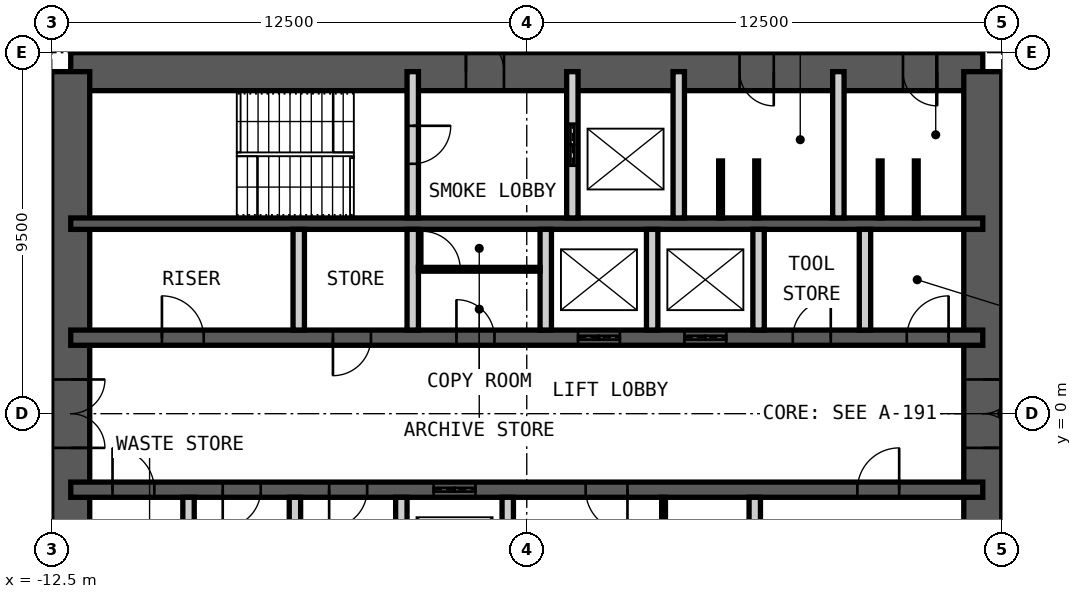
"""IFC4 building model, lengths in metres.
Left out: names, types, materials, properties, quantities, classifications, styles, units other than length and angle.
Written with IfcOpenShell. Run it as: python <this file> out.ifc"""

import sys

from ifc_helpers import new_model, si_unit, direction, frame, frame_2d, origin, place, context, subcontext, project, spatial, rectangle, extrude, element, fill, save


model = new_model("IFC4")
c1 = context("Model", 3, precision=1e-05, world=origin(), true_north=direction((0.0, 1.0)))
c2 = subcontext(c1, "Body", "Model", "MODEL_VIEW")
j1 = project(units=[si_unit("LENGTHUNIT", "METRE"), si_unit("PLANEANGLEUNIT", "RADIAN")], contexts=[c1])
p1 = place(None, origin())
s1 = spatial("IfcSite", under=j1, at=p1, CompositionType="ELEMENT")
p2 = place(p1, origin())
s2 = spatial("IfcBuilding", under=s1, at=p2, CompositionType="ELEMENT")
p3 = place(p2, frame((0.0, 0.0, 262.0)))
s3 = spatial("IfcBuildingStorey", under=s2, at=p3, CompositionType="ELEMENT", Elevation=262.0)
p4 = place(p3, frame((-12.0, 9.0, 0.0), z_axis=(0.0, 0.0, 1.0), x_axis=(1.0, 0.0, 0.0)))
e1 = element("IfcWall", 1, at=p4, inside=s3, PredefinedType="SHEAR", context=c2, shape_type="SweptSolid", body=[
    extrude(rectangle(XDim=24.0, YDim=1.0, at=frame_2d((12.0, 0.0))), origin(), (0.0, 0.0, 1.0), 4.2),
])
p5 = place(p4, frame((10.4, 0.0, 0.0)))
e2 = element("IfcOpeningElement", 2, at=p5, cuts=e1, PredefinedType="OPENING", context=c2, shape_type="SweptSolid", body=[
    extrude(rectangle(XDim=1.0, YDim=2.1, at=frame_2d((0.5, 1.05))), frame((0.0, 0.51, 0.0), z_axis=(0.0, -1.0, 0.0), x_axis=(1.0, 0.0, 0.0)), (0.0, 0.0, 1.0), 1.02),
])
p6 = place(p4, frame((17.6, 0.0, 0.0)))
e3 = element("IfcOpeningElement", 3, at=p6, cuts=e1, PredefinedType="OPENING", context=c2, shape_type="SweptSolid", body=[
    extrude(rectangle(XDim=0.9, YDim=2.1, at=frame_2d((0.45, 1.05))), frame((0.0, 0.51, 0.0), z_axis=(0.0, -1.0, 0.0), x_axis=(1.0, 0.0, 0.0)), (0.0, 0.0, 1.0), 1.02),
])
p7 = place(p4, frame((21.9, 0.0, 0.0)))
e4 = element("IfcOpeningElement", 4, at=p7, cuts=e1, PredefinedType="OPENING", context=c2, shape_type="SweptSolid", body=[
    extrude(rectangle(XDim=0.9, YDim=2.1, at=frame_2d((0.45, 1.05))), frame((0.0, 0.51, 0.0), z_axis=(0.0, -1.0, 0.0), x_axis=(1.0, 0.0, 0.0)), (0.0, 0.0, 1.0), 1.02),
])
p8 = place(p3, frame((12.0, -9.0, 0.0), z_axis=(0.0, 0.0, 1.0), x_axis=(0.0, 1.0, 0.0)))
e5 = element("IfcWall", 5, at=p8, inside=s3, PredefinedType="SHEAR", context=c2, shape_type="SweptSolid", body=[
    extrude(rectangle(XDim=18.0, YDim=1.0, at=frame_2d((9.0, 0.0))), origin(), (0.0, 0.0, 1.0), 4.2),
])
p9 = place(p8, frame((8.1, 0.0, 0.0)))
e6 = element("IfcOpeningElement", 6, at=p9, cuts=e5, PredefinedType="OPENING", context=c2, shape_type="SweptSolid", body=[
    extrude(rectangle(XDim=1.8, YDim=2.1, at=frame_2d((0.9, 1.05))), frame((0.0, 0.51, 0.0), z_axis=(0.0, -1.0, 0.0), x_axis=(1.0, 0.0, 0.0)), (0.0, 0.0, 1.0), 1.02),
])
p10 = place(p3, frame((-12.0, -9.0, 0.0), z_axis=(0.0, 0.0, 1.0), x_axis=(0.0, 1.0, 0.0)))
e7 = element("IfcWall", 7, at=p10, inside=s3, PredefinedType="SHEAR", context=c2, shape_type="SweptSolid", body=[
    extrude(rectangle(XDim=18.0, YDim=1.0, at=frame_2d((9.0, 0.0))), origin(), (0.0, 0.0, 1.0), 4.2),
])
p11 = place(p10, frame((8.1, 0.0, 0.0)))
e8 = element("IfcOpeningElement", 8, at=p11, cuts=e7, PredefinedType="OPENING", context=c2, shape_type="SweptSolid", body=[
    extrude(rectangle(XDim=1.8, YDim=2.1, at=frame_2d((0.9, 1.05))), frame((0.0, 0.51, 0.0), z_axis=(0.0, -1.0, 0.0), x_axis=(1.0, 0.0, 0.0)), (0.0, 0.0, 1.0), 1.02),
])
p12 = place(p3, frame((-12.0, 5.0, 0.0), z_axis=(0.0, 0.0, 1.0), x_axis=(1.0, 0.0, 0.0)))
e9 = element("IfcWall", 9, at=p12, inside=s3, PredefinedType="SHEAR", context=c2, shape_type="SweptSolid", body=[
    extrude(rectangle(XDim=24.0, YDim=0.3, at=frame_2d((12.0, 0.0))), origin(), (0.0, 0.0, 1.0), 4.2),
])
p13 = place(p3, frame((-12.0, 2.0, 0.0), z_axis=(0.0, 0.0, 1.0), x_axis=(1.0, 0.0, 0.0)))
e10 = element("IfcWall", 10, at=p13, inside=s3, PredefinedType="SHEAR", context=c2, shape_type="SweptSolid", body=[
    extrude(rectangle(XDim=24.0, YDim=0.4, at=frame_2d((12.0, 0.0))), origin(), (0.0, 0.0, 1.0), 4.2),
])
p14 = place(p13, frame((2.4, 0.0, 0.0)))
e11 = element("IfcOpeningElement", 11, at=p14, cuts=e10, PredefinedType="OPENING", context=c2, shape_type="SweptSolid", body=[
    extrude(rectangle(XDim=1.1, YDim=2.1, at=frame_2d((0.55, 1.05))), frame((0.0, 0.21, 0.0), z_axis=(0.0, -1.0, 0.0), x_axis=(1.0, 0.0, 0.0)), (0.0, 0.0, 1.0), 0.42),
])
p15 = place(p13, frame((22.0, 0.0, 0.0)))
e12 = element("IfcOpeningElement", 12, at=p15, cuts=e10, PredefinedType="OPENING", context=c2, shape_type="SweptSolid", body=[
    extrude(rectangle(XDim=1.1, YDim=2.1, at=frame_2d((0.55, 1.05))), frame((0.0, 0.21, 0.0), z_axis=(0.0, -1.0, 0.0), x_axis=(1.0, 0.0, 0.0)), (0.0, 0.0, 1.0), 0.42),
])
p16 = place(p13, frame((10.15, 0.0, 0.0)))
e13 = element("IfcOpeningElement", 13, at=p16, cuts=e10, PredefinedType="OPENING", context=c2, shape_type="SweptSolid", body=[
    extrude(rectangle(XDim=1.0, YDim=2.1, at=frame_2d((0.5, 1.05))), frame((0.0, 0.21, 0.0), z_axis=(0.0, -1.0, 0.0), x_axis=(1.0, 0.0, 0.0)), (0.0, 0.0, 1.0), 0.42),
])
p17 = place(p13, frame((6.9, 0.0, 0.0)))
e14 = element("IfcOpeningElement", 14, at=p17, cuts=e10, PredefinedType="OPENING", context=c2, shape_type="SweptSolid", body=[
    extrude(rectangle(XDim=1.0, YDim=2.1, at=frame_2d((0.5, 1.05))), frame((0.0, 0.21, 0.0), z_axis=(0.0, -1.0, 0.0), x_axis=(1.0, 0.0, 0.0)), (0.0, 0.0, 1.0), 0.42),
])
p18 = place(p13, frame((13.35, 0.0, 0.0)))
e15 = element("IfcOpeningElement", 15, at=p18, cuts=e10, PredefinedType="OPENING", context=c2, shape_type="SweptSolid", body=[
    extrude(rectangle(XDim=1.1, YDim=2.4, at=frame_2d((0.55, 1.2))), frame((0.0, 0.21, 0.0), z_axis=(0.0, -1.0, 0.0), x_axis=(1.0, 0.0, 0.0)), (0.0, 0.0, 1.0), 0.42),
])
p19 = place(p13, frame((16.15, 0.0, 0.0)))
e16 = element("IfcOpeningElement", 16, at=p19, cuts=e10, PredefinedType="OPENING", context=c2, shape_type="SweptSolid", body=[
    extrude(rectangle(XDim=1.1, YDim=2.4, at=frame_2d((0.55, 1.2))), frame((0.0, 0.21, 0.0), z_axis=(0.0, -1.0, 0.0), x_axis=(1.0, 0.0, 0.0)), (0.0, 0.0, 1.0), 0.42),
])
p20 = place(p13, frame((19.0, 0.0, 0.0)))
e17 = element("IfcOpeningElement", 17, at=p20, cuts=e10, PredefinedType="OPENING", context=c2, shape_type="SweptSolid", body=[
    extrude(rectangle(XDim=1.0, YDim=2.1, at=frame_2d((0.5, 1.05))), frame((0.0, 0.21, 0.0), z_axis=(0.0, -1.0, 0.0), x_axis=(1.0, 0.0, 0.0)), (0.0, 0.0, 1.0), 0.42),
])
p21 = place(p3, frame((-12.0, -2.0, 0.0), z_axis=(0.0, 0.0, 1.0), x_axis=(1.0, 0.0, 0.0)))
e18 = element("IfcWall", 18, at=p21, inside=s3, PredefinedType="SHEAR", context=c2, shape_type="SweptSolid", body=[
    extrude(rectangle(XDim=24.0, YDim=0.4, at=frame_2d((12.0, 0.0))), origin(), (0.0, 0.0, 1.0), 4.2),
])
p22 = place(p21, frame((1.1, 0.0, 0.0)))
e19 = element("IfcOpeningElement", 19, at=p22, cuts=e18, PredefinedType="OPENING", context=c2, shape_type="SweptSolid", body=[
    extrude(rectangle(XDim=1.1, YDim=2.1, at=frame_2d((0.55, 1.05))), frame((0.0, 0.21, 0.0), z_axis=(0.0, -1.0, 0.0), x_axis=(1.0, 0.0, 0.0)), (0.0, 0.0, 1.0), 0.42),
])
p23 = place(p21, frame((13.55, 0.0, 0.0)))
e20 = element("IfcOpeningElement", 20, at=p23, cuts=e18, PredefinedType="OPENING", context=c2, shape_type="SweptSolid", body=[
    extrude(rectangle(XDim=1.1, YDim=2.1, at=frame_2d((0.55, 1.05))), frame((0.0, 0.21, 0.0), z_axis=(0.0, -1.0, 0.0), x_axis=(1.0, 0.0, 0.0)), (0.0, 0.0, 1.0), 0.42),
])
p24 = place(p21, frame((20.7, 0.0, 0.0)))
e21 = element("IfcOpeningElement", 21, at=p24, cuts=e18, PredefinedType="OPENING", context=c2, shape_type="SweptSolid", body=[
    extrude(rectangle(XDim=1.1, YDim=2.1, at=frame_2d((0.55, 1.05))), frame((0.0, 0.21, 0.0), z_axis=(0.0, -1.0, 0.0), x_axis=(1.0, 0.0, 0.0)), (0.0, 0.0, 1.0), 0.42),
])
p25 = place(p21, frame((4.0, 0.0, 0.0)))
e22 = element("IfcOpeningElement", 22, at=p25, cuts=e18, PredefinedType="OPENING", context=c2, shape_type="SweptSolid", body=[
    extrude(rectangle(XDim=1.0, YDim=2.1, at=frame_2d((0.5, 1.05))), frame((0.0, 0.21, 0.0), z_axis=(0.0, -1.0, 0.0), x_axis=(1.0, 0.0, 0.0)), (0.0, 0.0, 1.0), 0.42),
])
p26 = place(p21, frame((6.8, 0.0, 0.0)))
e23 = element("IfcOpeningElement", 23, at=p26, cuts=e18, PredefinedType="OPENING", context=c2, shape_type="SweptSolid", body=[
    extrude(rectangle(XDim=1.0, YDim=2.1, at=frame_2d((0.5, 1.05))), frame((0.0, 0.21, 0.0), z_axis=(0.0, -1.0, 0.0), x_axis=(1.0, 0.0, 0.0)), (0.0, 0.0, 1.0), 0.42),
])
p27 = place(p21, frame((9.55, 0.0, 0.0)))
e24 = element("IfcOpeningElement", 24, at=p27, cuts=e18, PredefinedType="OPENING", context=c2, shape_type="SweptSolid", body=[
    extrude(rectangle(XDim=1.1, YDim=2.4, at=frame_2d((0.55, 1.2))), frame((0.0, 0.21, 0.0), z_axis=(0.0, -1.0, 0.0), x_axis=(1.0, 0.0, 0.0)), (0.0, 0.0, 1.0), 0.42),
])
p28 = place(p3, frame((-3.0, 5.15, 0.0), z_axis=(0.0, 0.0, 1.0), x_axis=(0.0, 1.0, 0.0)))
e25 = element("IfcWall", 25, at=p28, inside=s3, PredefinedType="PARTITIONING", context=c2, shape_type="SweptSolid", body=[
    extrude(rectangle(XDim=3.85, YDim=0.3, at=frame_2d((1.925, 0.0))), origin(), (0.0, 0.0, 1.0), 3.98),
])
p29 = place(p28, frame((1.425, 0.0, 0.0)))
e26 = element("IfcOpeningElement", 26, at=p29, cuts=e25, PredefinedType="OPENING", context=c2, shape_type="SweptSolid", body=[
    extrude(rectangle(XDim=1.0, YDim=2.1, at=frame_2d((0.5, 1.05))), frame((0.0, 0.16, 0.0), z_axis=(0.0, -1.0, 0.0), x_axis=(1.0, 0.0, 0.0)), (0.0, 0.0, 1.0), 0.32),
])
p30 = place(p3, frame((1.2, 5.15, 0.0), z_axis=(0.0, 0.0, 1.0), x_axis=(0.0, 1.0, 0.0)))
e27 = element("IfcWall", 27, at=p30, inside=s3, PredefinedType="PARTITIONING", context=c2, shape_type="SweptSolid", body=[
    extrude(rectangle(XDim=3.85, YDim=0.3, at=frame_2d((1.925, 0.0))), origin(), (0.0, 0.0, 1.0), 3.98),
])
p31 = place(p30, frame((1.375, 0.0, 0.0)))
e28 = element("IfcOpeningElement", 28, at=p31, cuts=e27, PredefinedType="OPENING", context=c2, shape_type="SweptSolid", body=[
    extrude(rectangle(XDim=1.1, YDim=2.4, at=frame_2d((0.55, 1.2))), frame((0.0, 0.16, 0.0), z_axis=(0.0, -1.0, 0.0), x_axis=(1.0, 0.0, 0.0)), (0.0, 0.0, 1.0), 0.32),
])
for number, where, z_axis, x_axis in (
    (29, (4.0, 5.15, 0.0), (0.0, 0.0, 1.0), (0.0, 1.0, 0.0)),
    (30, (8.2, 5.15, 0.0), (0.0, 0.0, 1.0), (0.0, 1.0, 0.0)),
):
    element("IfcWall", number, at=place(p3, frame(where, z_axis=z_axis, x_axis=x_axis)), inside=s3, PredefinedType="PARTITIONING", context=c2, shape_type="SweptSolid", body=[
        extrude(rectangle(XDim=3.85, YDim=0.3, at=frame_2d((1.925, 0.0))), origin(), (0.0, 0.0, 1.0), 3.98),
    ])
for number, where, z_axis, x_axis in (
    (31, (-6.0, 2.2, 0.0), (0.0, 0.0, 1.0), (0.0, 1.0, 0.0)),
    (32, (-3.0, 2.2, 0.0), (0.0, 0.0, 1.0), (0.0, 1.0, 0.0)),
    (33, (0.5, 2.2, 0.0), (0.0, 0.0, 1.0), (0.0, 1.0, 0.0)),
    (34, (3.3, 2.2, 0.0), (0.0, 0.0, 1.0), (0.0, 1.0, 0.0)),
    (35, (6.1, 2.2, 0.0), (0.0, 0.0, 1.0), (0.0, 1.0, 0.0)),
    (36, (8.9, 2.2, 0.0), (0.0, 0.0, 1.0), (0.0, 1.0, 0.0)),
    (37, (-8.9, -4.85, 0.0), (0.0, 0.0, 1.0), (0.0, 1.0, 0.0)),
    (38, (-6.1, -4.85, 0.0), (0.0, 0.0, 1.0), (0.0, 1.0, 0.0)),
    (39, (-3.3, -4.85, 0.0), (0.0, 0.0, 1.0), (0.0, 1.0, 0.0)),
    (40, (-0.5, -4.85, 0.0), (0.0, 0.0, 1.0), (0.0, 1.0, 0.0)),
    (41, (6.0, -4.85, 0.0), (0.0, 0.0, 1.0), (0.0, 1.0, 0.0)),
):
    element("IfcWall", number, at=place(p3, frame(where, z_axis=z_axis, x_axis=x_axis)), inside=s3, PredefinedType="PARTITIONING", context=c2, shape_type="SweptSolid", body=[
        extrude(rectangle(XDim=2.65, YDim=0.3, at=frame_2d((1.325, 0.0))), origin(), (0.0, 0.0, 1.0), 3.98),
    ])
p32 = place(p3, frame((-2.85, 3.8, 0.0), z_axis=(0.0, 0.0, 1.0), x_axis=(1.0, 0.0, 0.0)))
e42 = element("IfcWall", 42, at=p32, inside=s3, PredefinedType="PARTITIONING", context=c2, shape_type="SweptSolid", body=[
    extrude(rectangle(XDim=3.2, YDim=0.1, at=frame_2d((1.6, 0.0))), origin(), (0.0, 0.0, 1.0), 3.98),
])
p33 = place(p32, frame((0.1, 0.0, 0.0)))
e43 = element("IfcOpeningElement", 43, at=p33, cuts=e42, PredefinedType="OPENING", context=c2, shape_type="SweptSolid", body=[
    extrude(rectangle(XDim=1.0, YDim=2.4, at=frame_2d((0.5, 1.2))), frame((0.0, 0.06, 0.0), z_axis=(0.0, -1.0, 0.0), x_axis=(1.0, 0.0, 0.0)), (0.0, 0.0, 1.0), 0.12),
])
p34 = place(p3, frame((3.6, -4.85, 0.0), z_axis=(0.0, 0.0, 1.0), x_axis=(0.0, 1.0, 0.0)))
e44 = element("IfcWall", 44, at=p34, inside=s3, PredefinedType="PARTITIONING", context=c2, shape_type="SweptSolid", body=[
    extrude(rectangle(XDim=2.65, YDim=0.1, at=frame_2d((1.325, 0.0))), origin(), (0.0, 0.0, 1.0), 3.98),
])
p35 = place(p34, frame((0.1, 0.0, 0.0)))
e45 = element("IfcOpeningElement", 45, at=p35, cuts=e44, PredefinedType="OPENING", context=c2, shape_type="SweptSolid", body=[
    extrude(rectangle(XDim=1.0, YDim=2.4, at=frame_2d((0.5, 1.2))), frame((0.0, 0.06, 0.0), z_axis=(0.0, -1.0, 0.0), x_axis=(1.0, 0.0, 0.0)), (0.0, 0.0, 1.0), 0.12),
])
for number, where, z_axis, x_axis in (
    (46, (5.1, 5.15, 0.0), (0.0, 0.0, 1.0), (0.0, 1.0, 0.0)),
    (47, (6.05, 5.15, 0.0), (0.0, 0.0, 1.0), (0.0, 1.0, 0.0)),
    (48, (9.3, 5.15, 0.0), (0.0, 0.0, 1.0), (0.0, 1.0, 0.0)),
    (49, (10.25, 5.15, 0.0), (0.0, 0.0, 1.0), (0.0, 1.0, 0.0)),
):
    element("IfcWall", number, at=place(p3, frame(where, z_axis=z_axis, x_axis=x_axis)), inside=s3, PredefinedType="PARTITIONING", context=c2, shape_type="SweptSolid", body=[
        extrude(rectangle(XDim=1.5, YDim=0.1, at=frame_2d((0.75, 0.0))), origin(), (0.0, 0.0, 1.0), 2.1),
    ])
p36 = place(p5, origin())
e50 = element("IfcDoor", 50, at=p36, inside=s3, OperationType="SINGLE_SWING_RIGHT", PredefinedType="DOOR", context=c2, shape_type="SweptSolid", body=[
    extrude(rectangle(XDim=1.0, YDim=2.1, at=frame_2d((0.5, 1.05))), frame((0.0, 0.025, 0.0), z_axis=(0.0, -1.0, 0.0), x_axis=(1.0, 0.0, 0.0)), (0.0, 0.0, 1.0), 0.05),
])
fill(e2, e50)
p37 = place(p6, origin())
e51 = element("IfcDoor", 51, at=p37, inside=s3, OperationType="SINGLE_SWING_RIGHT", PredefinedType="DOOR", context=c2, shape_type="SweptSolid", body=[
    extrude(rectangle(XDim=0.9, YDim=2.1, at=frame_2d((0.45, 1.05))), frame((0.0, 0.025, 0.0), z_axis=(0.0, -1.0, 0.0), x_axis=(1.0, 0.0, 0.0)), (0.0, 0.0, 1.0), 0.05),
])
fill(e3, e51)
p38 = place(p7, origin())
e52 = element("IfcDoor", 52, at=p38, inside=s3, OperationType="SINGLE_SWING_RIGHT", PredefinedType="DOOR", context=c2, shape_type="SweptSolid", body=[
    extrude(rectangle(XDim=0.9, YDim=2.1, at=frame_2d((0.45, 1.05))), frame((0.0, 0.025, 0.0), z_axis=(0.0, -1.0, 0.0), x_axis=(1.0, 0.0, 0.0)), (0.0, 0.0, 1.0), 0.05),
])
fill(e4, e52)
p39 = place(p29, origin())
e53 = element("IfcDoor", 53, at=p39, inside=s3, OperationType="SINGLE_SWING_RIGHT", PredefinedType="DOOR", context=c2, shape_type="SweptSolid", body=[
    extrude(rectangle(XDim=1.0, YDim=2.1, at=frame_2d((0.5, 1.05))), frame((0.0, 0.025, 0.0), z_axis=(0.0, -1.0, 0.0), x_axis=(1.0, 0.0, 0.0)), (0.0, 0.0, 1.0), 0.05),
])
fill(e26, e53)
p40 = place(p14, origin())
e54 = element("IfcDoor", 54, at=p40, inside=s3, OperationType="SINGLE_SWING_RIGHT", PredefinedType="DOOR", context=c2, shape_type="SweptSolid", body=[
    extrude(rectangle(XDim=1.1, YDim=2.1, at=frame_2d((0.55, 1.05))), frame((0.0, 0.025, 0.0), z_axis=(0.0, -1.0, 0.0), x_axis=(1.0, 0.0, 0.0)), (0.0, 0.0, 1.0), 0.05),
])
fill(e11, e54)
p41 = place(p22, origin())
e55 = element("IfcDoor", 55, at=p41, inside=s3, OperationType="SINGLE_SWING_RIGHT", PredefinedType="DOOR", context=c2, shape_type="SweptSolid", body=[
    extrude(rectangle(XDim=1.1, YDim=2.1, at=frame_2d((0.55, 1.05))), frame((0.0, 0.025, 0.0), z_axis=(0.0, -1.0, 0.0), x_axis=(1.0, 0.0, 0.0)), (0.0, 0.0, 1.0), 0.05),
])
fill(e19, e55)
p42 = place(p15, origin())
e56 = element("IfcDoor", 56, at=p42, inside=s3, OperationType="SINGLE_SWING_LEFT", PredefinedType="DOOR", context=c2, shape_type="SweptSolid", body=[
    extrude(rectangle(XDim=1.1, YDim=2.1, at=frame_2d((0.55, 1.05))), frame((0.0, 0.025, 0.0), z_axis=(0.0, -1.0, 0.0), x_axis=(1.0, 0.0, 0.0)), (0.0, 0.0, 1.0), 0.05),
])
fill(e12, e56)
p43 = place(p16, origin())
e57 = element("IfcDoor", 57, at=p43, inside=s3, OperationType="SINGLE_SWING_RIGHT", PredefinedType="DOOR", context=c2, shape_type="SweptSolid", body=[
    extrude(rectangle(XDim=1.0, YDim=2.1, at=frame_2d((0.5, 1.05))), frame((0.0, 0.025, 0.0), z_axis=(0.0, -1.0, 0.0), x_axis=(1.0, 0.0, 0.0)), (0.0, 0.0, 1.0), 0.05),
])
fill(e13, e57)
p44 = place(p23, origin())
e58 = element("IfcDoor", 58, at=p44, inside=s3, OperationType="SINGLE_SWING_RIGHT", PredefinedType="DOOR", context=c2, shape_type="SweptSolid", body=[
    extrude(rectangle(XDim=1.1, YDim=2.1, at=frame_2d((0.55, 1.05))), frame((0.0, 0.025, 0.0), z_axis=(0.0, -1.0, 0.0), x_axis=(1.0, 0.0, 0.0)), (0.0, 0.0, 1.0), 0.05),
])
fill(e20, e58)
p45 = place(p24, origin())
e59 = element("IfcDoor", 59, at=p45, inside=s3, OperationType="SINGLE_SWING_LEFT", PredefinedType="DOOR", context=c2, shape_type="SweptSolid", body=[
    extrude(rectangle(XDim=1.1, YDim=2.1, at=frame_2d((0.55, 1.05))), frame((0.0, 0.025, 0.0), z_axis=(0.0, -1.0, 0.0), x_axis=(1.0, 0.0, 0.0)), (0.0, 0.0, 1.0), 0.05),
])
fill(e21, e59)
p46 = place(p9, origin())
e60 = element("IfcDoor", 60, at=p46, inside=s3, OperationType="DOUBLE_DOOR_DOUBLE_SWING", PredefinedType="DOOR", context=c2, shape_type="SweptSolid", body=[
    extrude(rectangle(XDim=1.8, YDim=2.1, at=frame_2d((0.9, 1.05))), frame((0.0, 0.025, 0.0), z_axis=(0.0, -1.0, 0.0), x_axis=(1.0, 0.0, 0.0)), (0.0, 0.0, 1.0), 0.05),
])
fill(e6, e60)
p47 = place(p11, origin())
e61 = element("IfcDoor", 61, at=p47, inside=s3, OperationType="DOUBLE_DOOR_DOUBLE_SWING", PredefinedType="DOOR", context=c2, shape_type="SweptSolid", body=[
    extrude(rectangle(XDim=1.8, YDim=2.1, at=frame_2d((0.9, 1.05))), frame((0.0, 0.025, 0.0), z_axis=(0.0, -1.0, 0.0), x_axis=(1.0, 0.0, 0.0)), (0.0, 0.0, 1.0), 0.05),
])
fill(e8, e61)
p48 = place(p31, origin())
e62 = element("IfcDoor", 62, at=p48, inside=s3, OperationType="DOUBLE_DOOR_SLIDING", PredefinedType="DOOR", context=c2, shape_type="SweptSolid", body=[
    extrude(rectangle(XDim=1.1, YDim=2.4, at=frame_2d((0.55, 1.2))), frame((0.0, 0.025, 0.0), z_axis=(0.0, -1.0, 0.0), x_axis=(1.0, 0.0, 0.0)), (0.0, 0.0, 1.0), 0.05),
])
fill(e28, e62)
p49 = place(p17, origin())
e63 = element("IfcDoor", 63, at=p49, inside=s3, OperationType="SINGLE_SWING_LEFT", PredefinedType="DOOR", context=c2, shape_type="SweptSolid", body=[
    extrude(rectangle(XDim=1.0, YDim=2.1, at=frame_2d((0.5, 1.05))), frame((0.0, 0.025, 0.0), z_axis=(0.0, -1.0, 0.0), x_axis=(1.0, 0.0, 0.0)), (0.0, 0.0, 1.0), 0.05),
])
fill(e14, e63)
p50 = place(p18, origin())
e64 = element("IfcDoor", 64, at=p50, inside=s3, OperationType="DOUBLE_DOOR_SLIDING", PredefinedType="DOOR", context=c2, shape_type="SweptSolid", body=[
    extrude(rectangle(XDim=1.1, YDim=2.4, at=frame_2d((0.55, 1.2))), frame((0.0, 0.025, 0.0), z_axis=(0.0, -1.0, 0.0), x_axis=(1.0, 0.0, 0.0)), (0.0, 0.0, 1.0), 0.05),
])
fill(e15, e64)
p51 = place(p19, origin())
e65 = element("IfcDoor", 65, at=p51, inside=s3, OperationType="DOUBLE_DOOR_SLIDING", PredefinedType="DOOR", context=c2, shape_type="SweptSolid", body=[
    extrude(rectangle(XDim=1.1, YDim=2.4, at=frame_2d((0.55, 1.2))), frame((0.0, 0.025, 0.0), z_axis=(0.0, -1.0, 0.0), x_axis=(1.0, 0.0, 0.0)), (0.0, 0.0, 1.0), 0.05),
])
fill(e16, e65)
p52 = place(p20, origin())
e66 = element("IfcDoor", 66, at=p52, inside=s3, OperationType="SINGLE_SWING_LEFT", PredefinedType="DOOR", context=c2, shape_type="SweptSolid", body=[
    extrude(rectangle(XDim=1.0, YDim=2.1, at=frame_2d((0.5, 1.05))), frame((0.0, 0.025, 0.0), z_axis=(0.0, -1.0, 0.0), x_axis=(1.0, 0.0, 0.0)), (0.0, 0.0, 1.0), 0.05),
])
fill(e17, e66)
p53 = place(p25, origin())
e67 = element("IfcDoor", 67, at=p53, inside=s3, OperationType="SINGLE_SWING_LEFT", PredefinedType="DOOR", context=c2, shape_type="SweptSolid", body=[
    extrude(rectangle(XDim=1.0, YDim=2.1, at=frame_2d((0.5, 1.05))), frame((0.0, 0.025, 0.0), z_axis=(0.0, -1.0, 0.0), x_axis=(1.0, 0.0, 0.0)), (0.0, 0.0, 1.0), 0.05),
])
fill(e22, e67)
p54 = place(p26, origin())
e68 = element("IfcDoor", 68, at=p54, inside=s3, OperationType="SINGLE_SWING_LEFT", PredefinedType="DOOR", context=c2, shape_type="SweptSolid", body=[
    extrude(rectangle(XDim=1.0, YDim=2.1, at=frame_2d((0.5, 1.05))), frame((0.0, 0.025, 0.0), z_axis=(0.0, -1.0, 0.0), x_axis=(1.0, 0.0, 0.0)), (0.0, 0.0, 1.0), 0.05),
])
fill(e23, e68)
p55 = place(p27, origin())
e69 = element("IfcDoor", 69, at=p55, inside=s3, OperationType="DOUBLE_DOOR_SLIDING", PredefinedType="DOOR", context=c2, shape_type="SweptSolid", body=[
    extrude(rectangle(XDim=1.1, YDim=2.4, at=frame_2d((0.55, 1.2))), frame((0.0, 0.025, 0.0), z_axis=(0.0, -1.0, 0.0), x_axis=(1.0, 0.0, 0.0)), (0.0, 0.0, 1.0), 0.05),
])
fill(e24, e69)
p56 = place(p33, origin())
e70 = element("IfcDoor", 70, at=p56, inside=s3, OperationType="SINGLE_SWING_RIGHT", PredefinedType="DOOR", context=c2, shape_type="SweptSolid", body=[
    extrude(rectangle(XDim=1.0, YDim=2.4, at=frame_2d((0.5, 1.2))), frame((0.0, 0.025, 0.0), z_axis=(0.0, -1.0, 0.0), x_axis=(1.0, 0.0, 0.0)), (0.0, 0.0, 1.0), 0.05),
])
fill(e43, e70)
save(model, sys.argv[1])
